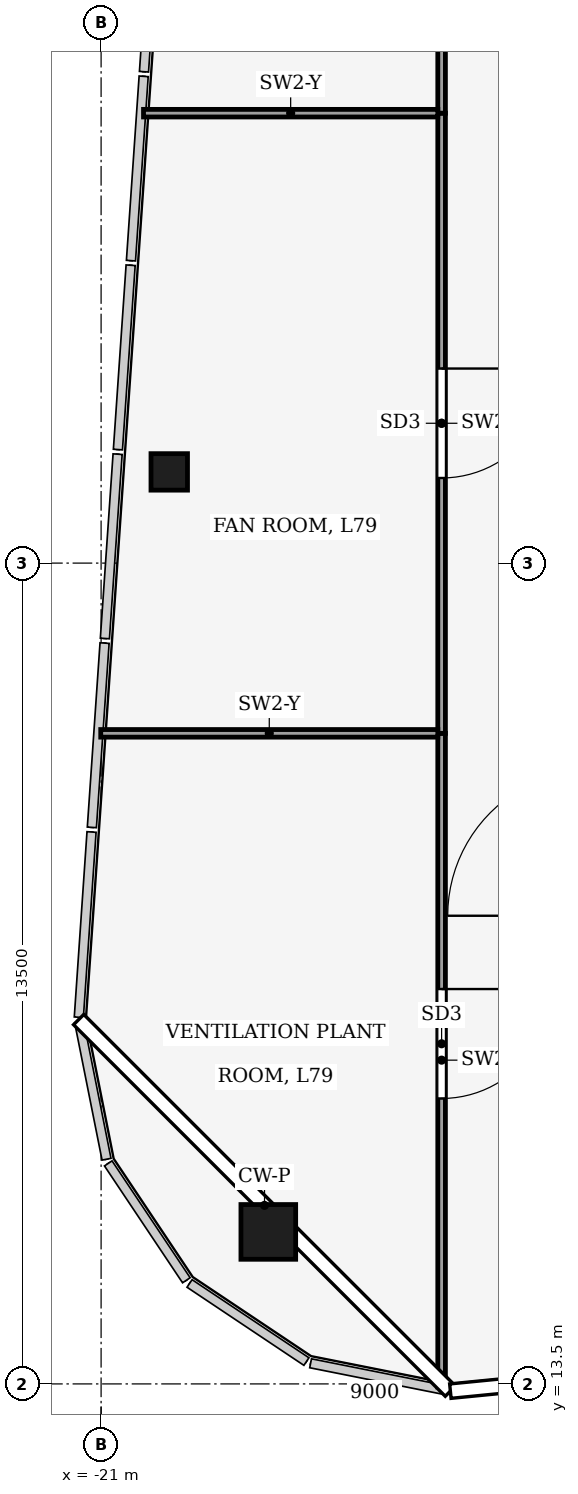
"""IFC4 building model, lengths in metres.
Left out: names, types, materials, properties, quantities, classifications, styles, units other than length and angle.
Written with IfcOpenShell. Run it as: python <this file> out.ifc"""

import sys

from ifc_helpers import new_model, si_unit, direction, frame, frame_2d, origin, origin_2d, place, context, subcontext, project, spatial, rectangle, hollow_rectangle, extrude, element, fill, save


model = new_model("IFC4")
c1 = context("Model", 3, precision=1e-05, world=origin(), true_north=direction((0.0, 1.0)))
c2 = subcontext(c1, "Body", "Model", "MODEL_VIEW")
j1 = project(units=[si_unit("LENGTHUNIT", "METRE"), si_unit("PLANEANGLEUNIT", "RADIAN")], contexts=[c1])
p1 = place(None, origin())
s1 = spatial("IfcSite", under=j1, at=p1, CompositionType="ELEMENT")
p2 = place(p1, origin())
s2 = spatial("IfcBuilding", under=s1, at=p2, CompositionType="ELEMENT")
p3 = place(p2, frame((0.0, 0.0, 349.5)))
s3 = spatial("IfcBuildingStorey", under=s2, at=p3, CompositionType="ELEMENT", Elevation=349.5)
p4 = place(p3, frame((-18.25, 16.0, 0.0), z_axis=(0.0, 0.0, 1.0), x_axis=(1.0, 0.0, 0.0)))
e1 = element("IfcColumn", 1, at=p4, inside=s3, PredefinedType="COLUMN", context=c2, shape_type="SweptSolid", body=[
    extrude(hollow_rectangle(XDim=0.9, YDim=0.9, WallThickness=0.04, at=origin_2d()), origin(), (0.0, 0.0, 1.0), 5.0),
])
p5 = place(p3, frame((-19.879, 28.5, 0.0), z_axis=(0.0, 0.0, 1.0), x_axis=(1.0, 0.0, 0.0)))
e2 = element("IfcColumn", 2, at=p5, inside=s3, PredefinedType="COLUMN", context=c2, shape_type="SweptSolid", body=[
    extrude(hollow_rectangle(XDim=0.6, YDim=0.6, WallThickness=0.025, at=origin_2d()), origin(), (0.0, 0.0, 1.0), 5.0),
])
p6 = place(p3, frame((-15.4, 24.2, 0.0), z_axis=(0.0, 0.0, 1.0), x_axis=(0.0, -1.0, 0.0)))
e3 = element("IfcWall", 3, at=p6, inside=s3, PredefinedType="PARTITIONING", context=c2, shape_type="SweptSolid", body=[
    extrude(rectangle(XDim=10.75, YDim=0.125, at=frame_2d((5.375, 0.0))), origin(), (0.0, 0.0, 1.0), 3.812),
])
p7 = place(p6, frame((4.206, 0.0, 0.0)))
e4 = element("IfcOpeningElement", 4, at=p7, cuts=e3, PredefinedType="OPENING", context=c2, shape_type="SweptSolid", body=[
    extrude(rectangle(XDim=1.8, YDim=2.4, at=frame_2d((0.9, 1.2))), frame((0.0, 0.073, 0.0), z_axis=(0.0, -1.0, 0.0), x_axis=(1.0, 0.0, 0.0)), (0.0, 0.0, 1.0), 0.145),
])
p8 = place(p3, frame((-15.4, 34.4, 0.0), z_axis=(0.0, 0.0, 1.0), x_axis=(0.0, -1.0, 0.0)))
e5 = element("IfcWall", 5, at=p8, inside=s3, PredefinedType="PARTITIONING", context=c2, shape_type="SweptSolid", body=[
    extrude(rectangle(XDim=10.2, YDim=0.125, at=frame_2d((5.1, 0.0))), origin(), (0.0, 0.0, 1.0), 4.52),
])
p9 = place(p8, frame((4.2, 0.0, 0.0)))
e6 = element("IfcOpeningElement", 6, at=p9, cuts=e5, PredefinedType="OPENING", context=c2, shape_type="SweptSolid", body=[
    extrude(rectangle(XDim=1.8, YDim=2.4, at=frame_2d((0.9, 1.2))), frame((0.0, 0.073, 0.0), z_axis=(0.0, -1.0, 0.0), x_axis=(1.0, 0.0, 0.0)), (0.0, 0.0, 1.0), 0.145),
])
p10 = place(p3, frame((-15.4, 44.6, 0.0), z_axis=(0.0, 0.0, 1.0), x_axis=(0.0, -1.0, 0.0)))
e7 = element("IfcWall", 7, at=p10, inside=s3, PredefinedType="PARTITIONING", context=c2, shape_type="SweptSolid", body=[
    extrude(rectangle(XDim=10.2, YDim=0.125, at=frame_2d((5.1, 0.0))), origin(), (0.0, 0.0, 1.0), 4.12),
])
p11 = place(p10, frame((4.6, 0.0, 0.0)))
e8 = element("IfcOpeningElement", 8, at=p11, cuts=e7, PredefinedType="OPENING", context=c2, shape_type="SweptSolid", body=[
    extrude(rectangle(XDim=1.0, YDim=2.1, at=frame_2d((0.5, 1.05))), frame((0.0, 0.073, 0.0), z_axis=(0.0, -1.0, 0.0), x_axis=(1.0, 0.0, 0.0)), (0.0, 0.0, 1.0), 0.145),
])
p12 = place(p3, frame((-21.006, 24.2, 0.0), z_axis=(0.0, 0.0, 1.0), x_axis=(1.0, 0.0, 0.0)))
e9 = element("IfcWall", 9, at=p12, inside=s3, PredefinedType="PARTITIONING", context=c2, shape_type="SweptSolid", body=[
    extrude(rectangle(XDim=5.543, YDim=0.125, at=frame_2d((2.772, 0.0))), origin(), (0.0, 0.0, 1.0), 4.02),
])
p13 = place(p3, frame((-20.302, 34.4, 0.0), z_axis=(0.0, 0.0, 1.0), x_axis=(1.0, 0.0, 0.0)))
e10 = element("IfcWall", 10, at=p13, inside=s3, PredefinedType="PARTITIONING", context=c2, shape_type="SweptSolid", body=[
    extrude(rectangle(XDim=4.84, YDim=0.125, at=frame_2d((2.42, 0.0))), origin(), (0.0, 0.0, 1.0), 4.02),
])
p14 = place(p7, origin())
e11 = element("IfcDoor", 11, at=p14, inside=s3, OperationType="DOUBLE_DOOR_SINGLE_SWING", PredefinedType="DOOR", context=c2, shape_type="SweptSolid", body=[
    extrude(rectangle(XDim=1.8, YDim=2.4, at=frame_2d((0.9, 1.2))), frame((0.0, 0.025, 0.0), z_axis=(0.0, -1.0, 0.0), x_axis=(1.0, 0.0, 0.0)), (0.0, 0.0, 1.0), 0.05),
])
fill(e4, e11)
p15 = place(p9, origin())
e12 = element("IfcDoor", 12, at=p15, inside=s3, OperationType="DOUBLE_DOOR_SINGLE_SWING", PredefinedType="DOOR", context=c2, shape_type="SweptSolid", body=[
    extrude(rectangle(XDim=1.8, YDim=2.4, at=frame_2d((0.9, 1.2))), frame((0.0, 0.025, 0.0), z_axis=(0.0, -1.0, 0.0), x_axis=(1.0, 0.0, 0.0)), (0.0, 0.0, 1.0), 0.05),
])
fill(e6, e12)
save(model, sys.argv[1])
